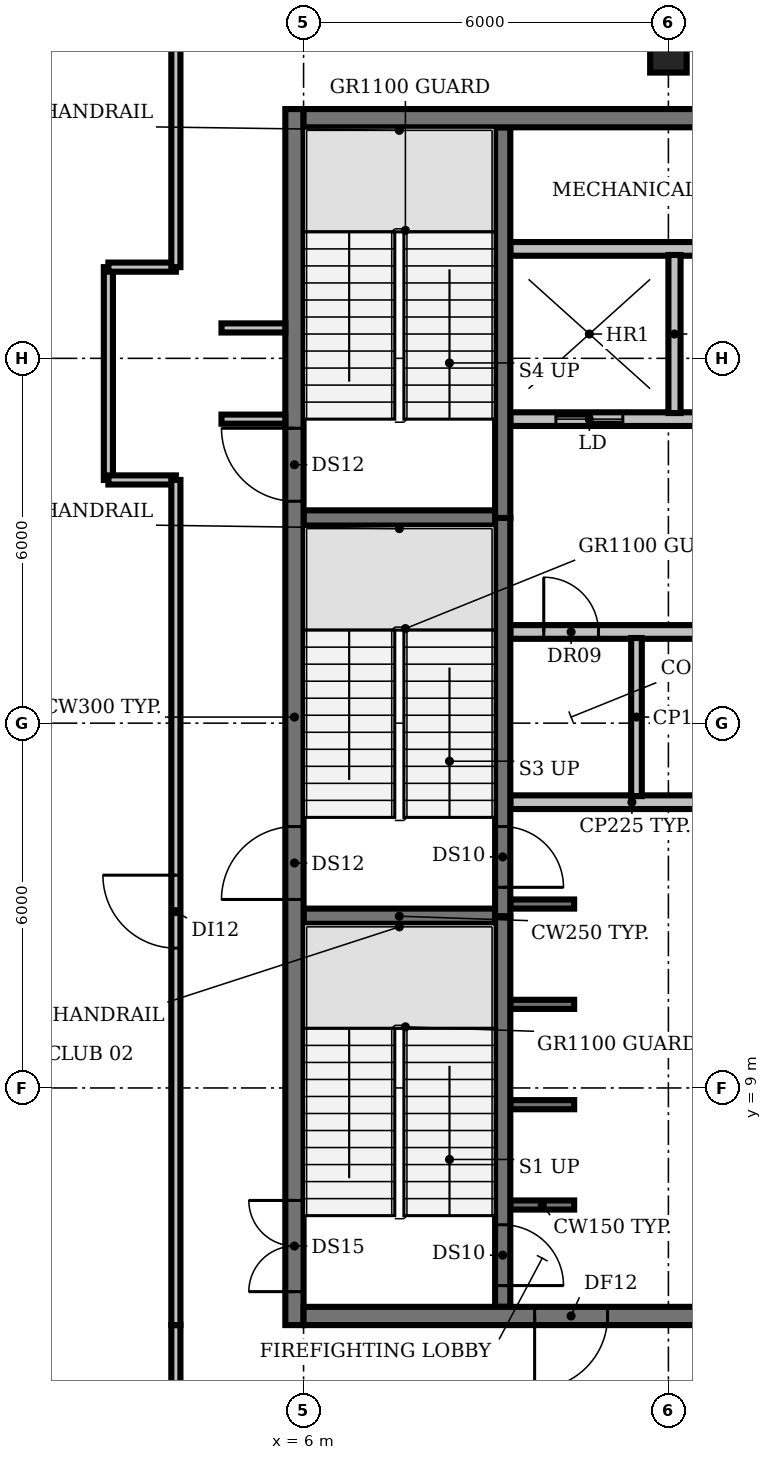
"""IFC4 building model, lengths in metres.
Left out: names, types, materials, properties, quantities, classifications, styles, units other than length and angle.
Written with IfcOpenShell. Run it as: python <this file> out.ifc"""

import sys

from ifc_helpers import new_model, si_unit, direction, frame, frame_2d, origin, origin_2d, place, context, subcontext, project, spatial, rectangle, extrude, element, fill, save


model = new_model("IFC4")
c1 = context("Model", 3, precision=1e-05, world=origin(), true_north=direction((0.0, 1.0)))
c2 = subcontext(c1, "Body", "Model", "MODEL_VIEW")
j1 = project(units=[si_unit("LENGTHUNIT", "METRE"), si_unit("PLANEANGLEUNIT", "RADIAN")], contexts=[c1])
p1 = place(None, origin())
s1 = spatial("IfcSite", under=j1, at=p1, CompositionType="ELEMENT")
p2 = place(p1, origin())
s2 = spatial("IfcBuilding", under=s1, at=p2, CompositionType="ELEMENT")
p3 = place(p2, frame((0.0, 0.0, 323.0)))
s3 = spatial("IfcBuildingStorey", under=s2, at=p3, CompositionType="ELEMENT", Elevation=323.0)
p4 = place(p3, frame((12.0, 26.0, 0.0), z_axis=(0.0, 0.0, 1.0), x_axis=(1.0, 0.0, 0.0)))
e1 = element("IfcColumn", 1, at=p4, inside=s3, PredefinedType="COLUMN", context=c2, shape_type="SweptSolid", body=[
    extrude(rectangle(XDim=0.6, YDim=0.6, at=origin_2d()), origin(), (0.0, 0.0, 1.0), 3.9),
])
for number, where, z_axis, x_axis in (
    (2, (9.4, 7.075, 0.0), (0.0, 0.0, 1.0), (1.0, 0.0, 0.0)),
    (3, (9.4, 8.725, 0.0), (0.0, 0.0, 1.0), (1.0, 0.0, 0.0)),
    (4, (9.4, 10.375, 0.0), (0.0, 0.0, 1.0), (1.0, 0.0, 0.0)),
):
    element("IfcWall", number, at=place(p3, frame(where, z_axis=z_axis, x_axis=x_axis)), inside=s3, PredefinedType="SHEAR", context=c2, shape_type="SweptSolid", body=[
        extrude(rectangle(XDim=1.05, YDim=0.15, at=frame_2d((0.525, 0.0))), origin(), (0.0, 0.0, 1.0), 3.9),
    ])
p5 = place(p3, frame((6.0, 11.825, 0.0), z_axis=(0.0, 0.0, 1.0), x_axis=(1.0, 0.0, 0.0)))
e5 = element("IfcWall", 5, at=p5, inside=s3, PredefinedType="SHEAR", context=c2, shape_type="SweptSolid", body=[
    extrude(rectangle(XDim=3.15, YDim=0.25, at=frame_2d((1.575, 0.0))), origin(), (0.0, 0.0, 1.0), 3.9),
])
p6 = place(p3, frame((9.4, 12.025, 0.0), z_axis=(0.0, 0.0, 1.0), x_axis=(1.0, 0.0, 0.0)))
e6 = element("IfcWall", 6, at=p6, inside=s3, PredefinedType="SHEAR", context=c2, shape_type="SweptSolid", body=[
    extrude(rectangle(XDim=1.05, YDim=0.15, at=frame_2d((0.525, 0.0))), origin(), (0.0, 0.0, 1.0), 3.9),
])
p7 = place(p3, frame((9.4, 13.7, 0.0), z_axis=(0.0, 0.0, 1.0), x_axis=(1.0, 0.0, 0.0)))
e7 = element("IfcWall", 7, at=p7, inside=s3, PredefinedType="PARTITIONING", context=c2, shape_type="SweptSolid", body=[
    extrude(rectangle(XDim=4.0, YDim=0.225, at=frame_2d((2.0, 0.0))), origin(), (0.0, 0.0, 1.0), 3.9),
])
p8 = place(p3, frame((9.4, 16.5, 0.0), z_axis=(0.0, 0.0, 1.0), x_axis=(1.0, 0.0, 0.0)))
e8 = element("IfcWall", 8, at=p8, inside=s3, PredefinedType="PARTITIONING", context=c2, shape_type="SweptSolid", body=[
    extrude(rectangle(XDim=14.6, YDim=0.225, at=frame_2d((7.3, 0.0))), origin(), (0.0, 0.0, 1.0), 3.9),
])
p9 = place(p8, frame((0.55, 0.0, 0.0)))
e9 = element("IfcOpeningElement", 9, at=p9, cuts=e8, PredefinedType="OPENING", context=c2, shape_type="SweptSolid", body=[
    extrude(rectangle(XDim=0.9, YDim=2.1, at=frame_2d((0.45, 1.05))), frame((0.0, 0.123, 0.0), z_axis=(0.0, -1.0, 0.0), x_axis=(1.0, 0.0, 0.0)), (0.0, 0.0, 1.0), 0.245),
])
p10 = place(p8, frame((6.075, 0.0, 0.0)))
e10 = element("IfcOpeningElement", 10, at=p10, cuts=e8, PredefinedType="OPENING", context=c2, shape_type="SweptSolid", body=[
    extrude(rectangle(XDim=1.0, YDim=2.1, at=frame_2d((0.5, 1.05))), frame((0.0, 0.123, 0.0), z_axis=(0.0, -1.0, 0.0), x_axis=(1.0, 0.0, 0.0)), (0.0, 0.0, 1.0), 0.245),
])
p11 = place(p8, frame((11.647, 0.0, 0.0)))
e11 = element("IfcOpeningElement", 11, at=p11, cuts=e8, PredefinedType="OPENING", context=c2, shape_type="SweptSolid", body=[
    extrude(rectangle(XDim=0.9, YDim=2.1, at=frame_2d((0.45, 1.05))), frame((0.0, 0.123, 0.0), z_axis=(0.0, -1.0, 0.0), x_axis=(1.0, 0.0, 0.0)), (0.0, 0.0, 1.0), 0.245),
])
p12 = place(p8, frame((13.423, 0.0, 0.0)))
e12 = element("IfcOpeningElement", 12, at=p12, cuts=e8, PredefinedType="OPENING", context=c2, shape_type="SweptSolid", body=[
    extrude(rectangle(XDim=0.9, YDim=2.1, at=frame_2d((0.45, 1.05))), frame((0.0, 0.123, 0.0), z_axis=(0.0, -1.0, 0.0), x_axis=(1.0, 0.0, 0.0)), (0.0, 0.0, 1.0), 0.245),
])
p13 = place(p3, frame((6.0, 18.375, 0.0), z_axis=(0.0, 0.0, 1.0), x_axis=(1.0, 0.0, 0.0)))
e13 = element("IfcWall", 13, at=p13, inside=s3, PredefinedType="SHEAR", context=c2, shape_type="SweptSolid", body=[
    extrude(rectangle(XDim=3.15, YDim=0.25, at=frame_2d((1.575, 0.0))), origin(), (0.0, 0.0, 1.0), 3.9),
])
p14 = place(p3, frame((24.0, 20.0, 0.0), z_axis=(0.0, 0.0, 1.0), x_axis=(-1.0, 0.0, 0.0)))
e14 = element("IfcWall", 14, at=p14, inside=s3, PredefinedType="PARTITIONING", context=c2, shape_type="SweptSolid", body=[
    extrude(rectangle(XDim=14.6, YDim=0.225, at=frame_2d((7.3, 0.0))), origin(), (0.0, 0.0, 1.0), 3.9),
])
p15 = place(p14, frame((12.75, 0.0, 0.0)))
e15 = element("IfcOpeningElement", 15, at=p15, cuts=e14, PredefinedType="OPENING", context=c2, shape_type="SweptSolid", body=[
    extrude(rectangle(XDim=1.1, YDim=2.1, at=frame_2d((0.55, 1.05))), frame((0.0, 0.123, 0.0), z_axis=(0.0, -1.0, 0.0), x_axis=(1.0, 0.0, 0.0)), (0.0, 0.0, 1.0), 0.245),
])
p16 = place(p14, frame((9.95, 0.0, 0.0)))
e16 = element("IfcOpeningElement", 16, at=p16, cuts=e14, PredefinedType="OPENING", context=c2, shape_type="SweptSolid", body=[
    extrude(rectangle(XDim=1.1, YDim=2.1, at=frame_2d((0.55, 1.05))), frame((0.0, 0.123, 0.0), z_axis=(0.0, -1.0, 0.0), x_axis=(1.0, 0.0, 0.0)), (0.0, 0.0, 1.0), 0.245),
])
p17 = place(p14, frame((7.15, 0.0, 0.0)))
e17 = element("IfcOpeningElement", 17, at=p17, cuts=e14, PredefinedType="OPENING", context=c2, shape_type="SweptSolid", body=[
    extrude(rectangle(XDim=1.1, YDim=2.1, at=frame_2d((0.55, 1.05))), frame((0.0, 0.123, 0.0), z_axis=(0.0, -1.0, 0.0), x_axis=(1.0, 0.0, 0.0)), (0.0, 0.0, 1.0), 0.245),
])
p18 = place(p14, frame((4.35, 0.0, 0.0)))
e18 = element("IfcOpeningElement", 18, at=p18, cuts=e14, PredefinedType="OPENING", context=c2, shape_type="SweptSolid", body=[
    extrude(rectangle(XDim=1.1, YDim=2.1, at=frame_2d((0.55, 1.05))), frame((0.0, 0.123, 0.0), z_axis=(0.0, -1.0, 0.0), x_axis=(1.0, 0.0, 0.0)), (0.0, 0.0, 1.0), 0.245),
])
p19 = place(p14, frame((2.137, 0.0, 0.0)))
e19 = element("IfcOpeningElement", 19, at=p19, cuts=e14, PredefinedType="OPENING", context=c2, shape_type="SweptSolid", body=[
    extrude(rectangle(XDim=0.9, YDim=2.1, at=frame_2d((0.45, 1.05))), frame((0.0, 0.123, 0.0), z_axis=(0.0, -1.0, 0.0), x_axis=(1.0, 0.0, 0.0)), (0.0, 0.0, 1.0), 0.245),
])
p20 = place(p14, frame((0.562, 0.0, 0.0)))
e20 = element("IfcOpeningElement", 20, at=p20, cuts=e14, PredefinedType="OPENING", context=c2, shape_type="SweptSolid", body=[
    extrude(rectangle(XDim=0.9, YDim=2.1, at=frame_2d((0.45, 1.05))), frame((0.0, 0.123, 0.0), z_axis=(0.0, -1.0, 0.0), x_axis=(1.0, 0.0, 0.0)), (0.0, 0.0, 1.0), 0.245),
])
p21 = place(p3, frame((9.4, 22.8, 0.0), z_axis=(0.0, 0.0, 1.0), x_axis=(1.0, 0.0, 0.0)))
e21 = element("IfcWall", 21, at=p21, inside=s3, PredefinedType="PARTITIONING", context=c2, shape_type="SweptSolid", body=[
    extrude(rectangle(XDim=14.6, YDim=0.225, at=frame_2d((7.3, 0.0))), origin(), (0.0, 0.0, 1.0), 3.9),
])
p22 = place(p3, frame((9.275, 11.825, 0.0), z_axis=(0.0, 0.0, 1.0), x_axis=(0.0, -1.0, 0.0)))
e22 = element("IfcWall", 22, at=p22, inside=s3, PredefinedType="SHEAR", context=c2, shape_type="SweptSolid", body=[
    extrude(rectangle(XDim=6.425, YDim=0.25, at=frame_2d((3.212, 0.0))), origin(), (0.0, 0.0, 1.0), 3.9),
])
p23 = place(p22, frame((5.075, 0.0, 0.0)))
e23 = element("IfcOpeningElement", 23, at=p23, cuts=e22, PredefinedType="OPENING", context=c2, shape_type="SweptSolid", body=[
    extrude(rectangle(XDim=1.0, YDim=2.1, at=frame_2d((0.5, 1.05))), frame((0.0, 0.135, 0.0), z_axis=(0.0, -1.0, 0.0), x_axis=(1.0, 0.0, 0.0)), (0.0, 0.0, 1.0), 0.27),
])
p24 = place(p3, frame((9.275, 18.375, 0.0), z_axis=(0.0, 0.0, 1.0), x_axis=(0.0, -1.0, 0.0)))
e24 = element("IfcWall", 24, at=p24, inside=s3, PredefinedType="SHEAR", context=c2, shape_type="SweptSolid", body=[
    extrude(rectangle(XDim=6.55, YDim=0.25, at=frame_2d((3.275, 0.0))), origin(), (0.0, 0.0, 1.0), 3.9),
])
p25 = place(p24, frame((5.075, 0.0, 0.0)))
e25 = element("IfcOpeningElement", 25, at=p25, cuts=e24, PredefinedType="OPENING", context=c2, shape_type="SweptSolid", body=[
    extrude(rectangle(XDim=1.0, YDim=2.1, at=frame_2d((0.5, 1.05))), frame((0.0, 0.135, 0.0), z_axis=(0.0, -1.0, 0.0), x_axis=(1.0, 0.0, 0.0)), (0.0, 0.0, 1.0), 0.27),
])
p26 = place(p3, frame((9.275, 18.375, 0.0), z_axis=(0.0, 0.0, 1.0), x_axis=(0.0, 1.0, 0.0)))
e26 = element("IfcWall", 26, at=p26, inside=s3, PredefinedType="SHEAR", context=c2, shape_type="SweptSolid", body=[
    extrude(rectangle(XDim=6.425, YDim=0.25, at=frame_2d((3.212, 0.0))), origin(), (0.0, 0.0, 1.0), 3.9),
])
p27 = place(p3, frame((11.475, 13.8, 0.0), z_axis=(0.0, 0.0, 1.0), x_axis=(0.0, 1.0, 0.0)))
e27 = element("IfcWall", 27, at=p27, inside=s3, PredefinedType="PARTITIONING", context=c2, shape_type="SweptSolid", body=[
    extrude(rectangle(XDim=2.6, YDim=0.175, at=frame_2d((1.3, 0.0))), origin(), (0.0, 0.0, 1.0), 3.9),
])
p28 = place(p3, frame((12.1, 20.1, 0.0), z_axis=(0.0, 0.0, 1.0), x_axis=(0.0, 1.0, 0.0)))
e28 = element("IfcWall", 28, at=p28, inside=s3, PredefinedType="SOLIDWALL", context=c2, shape_type="SweptSolid", body=[
    extrude(rectangle(XDim=2.6, YDim=0.2, at=frame_2d((1.3, 0.0))), origin(), (0.0, 0.0, 1.0), 3.9),
])
p29 = place(p3, frame((5.85, 5.1, 0.0), z_axis=(0.0, 0.0, 1.0), x_axis=(0.0, 1.0, 0.0)))
e29 = element("IfcWall", 29, at=p29, inside=s3, PredefinedType="SHEAR", context=c2, shape_type="SweptSolid", body=[
    extrude(rectangle(XDim=20.0, YDim=0.3, at=frame_2d((10.0, 0.0))), origin(), (0.0, 0.0, 1.0), 3.9),
])
p30 = place(p29, frame((0.55, 0.0, 0.0)))
e30 = element("IfcOpeningElement", 30, at=p30, cuts=e29, PredefinedType="OPENING", context=c2, shape_type="SweptSolid", body=[
    extrude(rectangle(XDim=1.5, YDim=2.1, at=frame_2d((0.75, 1.05))), frame((0.0, 0.16, 0.0), z_axis=(0.0, -1.0, 0.0), x_axis=(1.0, 0.0, 0.0)), (0.0, 0.0, 1.0), 0.32),
])
p31 = place(p29, frame((7.0, 0.0, 0.0)))
e31 = element("IfcOpeningElement", 31, at=p31, cuts=e29, PredefinedType="OPENING", context=c2, shape_type="SweptSolid", body=[
    extrude(rectangle(XDim=1.2, YDim=2.1, at=frame_2d((0.6, 1.05))), frame((0.0, 0.16, 0.0), z_axis=(0.0, -1.0, 0.0), x_axis=(1.0, 0.0, 0.0)), (0.0, 0.0, 1.0), 0.32),
])
p32 = place(p29, frame((13.55, 0.0, 0.0)))
e32 = element("IfcOpeningElement", 32, at=p32, cuts=e29, PredefinedType="OPENING", context=c2, shape_type="SweptSolid", body=[
    extrude(rectangle(XDim=1.2, YDim=2.1, at=frame_2d((0.6, 1.05))), frame((0.0, 0.16, 0.0), z_axis=(0.0, -1.0, 0.0), x_axis=(1.0, 0.0, 0.0)), (0.0, 0.0, 1.0), 0.32),
])
p33 = place(p3, frame((24.0, 5.25, 0.0), z_axis=(0.0, 0.0, 1.0), x_axis=(-1.0, 0.0, 0.0)))
e33 = element("IfcWall", 33, at=p33, inside=s3, PredefinedType="SHEAR", context=c2, shape_type="SweptSolid", body=[
    extrude(rectangle(XDim=18.0, YDim=0.3, at=frame_2d((9.0, 0.0))), origin(), (0.0, 0.0, 1.0), 3.9),
])
p34 = place(p33, frame((13.0, 0.0, 0.0)))
e34 = element("IfcOpeningElement", 34, at=p34, cuts=e33, PredefinedType="OPENING", context=c2, shape_type="SweptSolid", body=[
    extrude(rectangle(XDim=1.2, YDim=2.1, at=frame_2d((0.6, 1.05))), frame((0.0, 0.16, 0.0), z_axis=(0.0, -1.0, 0.0), x_axis=(1.0, 0.0, 0.0)), (0.0, 0.0, 1.0), 0.32),
])
p35 = place(p33, frame((4.9, 0.0, 0.0)))
e35 = element("IfcOpeningElement", 35, at=p35, cuts=e33, PredefinedType="OPENING", context=c2, shape_type="SweptSolid", body=[
    extrude(rectangle(XDim=1.0, YDim=2.1, at=frame_2d((0.5, 1.05))), frame((0.0, 0.16, 0.0), z_axis=(0.0, -1.0, 0.0), x_axis=(1.0, 0.0, 0.0)), (0.0, 0.0, 1.0), 0.32),
])
p36 = place(p3, frame((6.0, 24.95, 0.0), z_axis=(0.0, 0.0, 1.0), x_axis=(1.0, 0.0, 0.0)))
e36 = element("IfcWall", 36, at=p36, inside=s3, PredefinedType="SHEAR", context=c2, shape_type="SweptSolid", body=[
    extrude(rectangle(XDim=18.0, YDim=0.3, at=frame_2d((9.0, 0.0))), origin(), (0.0, 0.0, 1.0), 3.9),
])
p37 = place(p3, frame((2.79, 19.0, 0.0), z_axis=(0.0, 0.0, 1.0), x_axis=(0.0, 1.0, 0.0)))
e37 = element("IfcWall", 37, at=p37, inside=s3, PredefinedType="PARTITIONING", context=c2, shape_type="SweptSolid", body=[
    extrude(rectangle(XDim=3.5, YDim=0.15, at=frame_2d((1.75, 0.0))), origin(), (0.0, 0.0, 1.0), 2.48),
])
for number, where, z_axis, x_axis in (
    (38, (2.79, 19.0, 0.0), (0.0, 0.0, 1.0), (1.0, 0.0, 0.0)),
    (39, (2.79, 22.5, 0.0), (0.0, 0.0, 1.0), (1.0, 0.0, 0.0)),
):
    element("IfcWall", number, at=place(p3, frame(where, z_axis=z_axis, x_axis=x_axis)), inside=s3, PredefinedType="PARTITIONING", context=c2, shape_type="SweptSolid", body=[
        extrude(rectangle(XDim=1.11, YDim=0.15, at=frame_2d((0.555, 0.0))), origin(), (0.0, 0.0, 1.0), 2.48),
    ])
p38 = place(p3, frame((3.9, 2.1, 0.0), z_axis=(0.0, 0.0, 1.0), x_axis=(0.0, 1.0, 0.0)))
e40 = element("IfcWall", 40, at=p38, inside=s3, PredefinedType="PARTITIONING", context=c2, shape_type="SweptSolid", body=[
    extrude(rectangle(XDim=3.0, YDim=0.15, at=frame_2d((1.5, 0.0))), origin(), (0.0, 0.0, 1.0), 2.48),
])
p39 = place(p3, frame((3.9, 5.1, 0.0), z_axis=(0.0, 0.0, 1.0), x_axis=(0.0, 1.0, 0.0)))
e41 = element("IfcWall", 41, at=p39, inside=s3, PredefinedType="PARTITIONING", context=c2, shape_type="SweptSolid", body=[
    extrude(rectangle(XDim=13.9, YDim=0.15, at=frame_2d((6.95, 0.0))), origin(), (0.0, 0.0, 1.0), 2.48),
])
p40 = place(p39, frame((6.2, 0.0, 0.0)))
e42 = element("IfcOpeningElement", 42, at=p40, cuts=e41, PredefinedType="OPENING", context=c2, shape_type="SweptSolid", body=[
    extrude(rectangle(XDim=1.2, YDim=2.1, at=frame_2d((0.6, 1.05))), frame((0.0, 0.085, 0.0), z_axis=(0.0, -1.0, 0.0), x_axis=(1.0, 0.0, 0.0)), (0.0, 0.0, 1.0), 0.17),
])
p41 = place(p3, frame((3.9, 22.5, 0.0), z_axis=(0.0, 0.0, 1.0), x_axis=(0.0, 1.0, 0.0)))
e43 = element("IfcWall", 43, at=p41, inside=s3, PredefinedType="PARTITIONING", context=c2, shape_type="SweptSolid", body=[
    extrude(rectangle(XDim=5.6, YDim=0.15, at=frame_2d((2.8, 0.0))), origin(), (0.0, 0.0, 1.0), 2.48),
])
for number, where, z_axis, x_axis in (
    (44, (4.65, 20.0, 0.0), (0.0, 0.0, 1.0), (1.0, 0.0, 0.0)),
    (45, (4.65, 21.5, 0.0), (0.0, 0.0, 1.0), (1.0, 0.0, 0.0)),
):
    element("IfcWall", number, at=place(p3, frame(where, z_axis=z_axis, x_axis=x_axis)), inside=s3, PredefinedType="PARTITIONING", context=c2, shape_type="SweptSolid", body=[
        extrude(rectangle(XDim=1.05, YDim=0.15, at=frame_2d((0.525, 0.0))), origin(), (0.0, 0.0, 1.0), 2.48),
    ])
p42 = place(p9, origin())
e46 = element("IfcDoor", 46, at=p42, inside=s3, OperationType="SINGLE_SWING_LEFT", PredefinedType="DOOR", context=c2, shape_type="SweptSolid", body=[
    extrude(rectangle(XDim=0.9, YDim=2.1, at=frame_2d((0.45, 1.05))), frame((0.0, 0.025, 0.0), z_axis=(0.0, -1.0, 0.0), x_axis=(1.0, 0.0, 0.0)), (0.0, 0.0, 1.0), 0.05),
])
fill(e9, e46)
p43 = place(p15, origin())
e47 = element("IfcDoor", 47, at=p43, inside=s3, OperationType="DOUBLE_DOOR_SLIDING", PredefinedType="DOOR", context=c2, shape_type="SweptSolid", body=[
    extrude(rectangle(XDim=1.1, YDim=2.1, at=frame_2d((0.55, 1.05))), frame((0.0, 0.025, 0.0), z_axis=(0.0, -1.0, 0.0), x_axis=(1.0, 0.0, 0.0)), (0.0, 0.0, 1.0), 0.05),
])
fill(e15, e47)
p44 = place(p23, origin())
e48 = element("IfcDoor", 48, at=p44, inside=s3, OperationType="SINGLE_SWING_RIGHT", PredefinedType="DOOR", context=c2, shape_type="SweptSolid", body=[
    extrude(rectangle(XDim=1.0, YDim=2.1, at=frame_2d((0.5, 1.05))), frame((0.0, 0.025, 0.0), z_axis=(0.0, -1.0, 0.0), x_axis=(1.0, 0.0, 0.0)), (0.0, 0.0, 1.0), 0.05),
])
fill(e23, e48)
p45 = place(p25, origin())
e49 = element("IfcDoor", 49, at=p45, inside=s3, OperationType="SINGLE_SWING_RIGHT", PredefinedType="DOOR", context=c2, shape_type="SweptSolid", body=[
    extrude(rectangle(XDim=1.0, YDim=2.1, at=frame_2d((0.5, 1.05))), frame((0.0, 0.025, 0.0), z_axis=(0.0, -1.0, 0.0), x_axis=(1.0, 0.0, 0.0)), (0.0, 0.0, 1.0), 0.05),
])
fill(e25, e49)
p46 = place(p30, origin())
e50 = element("IfcDoor", 50, at=p46, inside=s3, OperationType="DOUBLE_DOOR_SINGLE_SWING", PredefinedType="DOOR", context=c2, shape_type="SweptSolid", body=[
    extrude(rectangle(XDim=1.5, YDim=2.1, at=frame_2d((0.75, 1.05))), frame((0.0, 0.025, 0.0), z_axis=(0.0, -1.0, 0.0), x_axis=(1.0, 0.0, 0.0)), (0.0, 0.0, 1.0), 0.05),
])
fill(e30, e50)
p47 = place(p31, origin())
e51 = element("IfcDoor", 51, at=p47, inside=s3, OperationType="SINGLE_SWING_LEFT", PredefinedType="DOOR", context=c2, shape_type="SweptSolid", body=[
    extrude(rectangle(XDim=1.2, YDim=2.1, at=frame_2d((0.6, 1.05))), frame((0.0, 0.025, 0.0), z_axis=(0.0, -1.0, 0.0), x_axis=(1.0, 0.0, 0.0)), (0.0, 0.0, 1.0), 0.05),
])
fill(e31, e51)
p48 = place(p32, origin())
e52 = element("IfcDoor", 52, at=p48, inside=s3, OperationType="SINGLE_SWING_RIGHT", PredefinedType="DOOR", context=c2, shape_type="SweptSolid", body=[
    extrude(rectangle(XDim=1.2, YDim=2.1, at=frame_2d((0.6, 1.05))), frame((0.0, 0.025, 0.0), z_axis=(0.0, -1.0, 0.0), x_axis=(1.0, 0.0, 0.0)), (0.0, 0.0, 1.0), 0.05),
])
fill(e32, e52)
p49 = place(p34, origin())
e53 = element("IfcDoor", 53, at=p49, inside=s3, OperationType="SINGLE_SWING_RIGHT", PredefinedType="DOOR", context=c2, shape_type="SweptSolid", body=[
    extrude(rectangle(XDim=1.2, YDim=2.1, at=frame_2d((0.6, 1.05))), frame((0.0, 0.025, 0.0), z_axis=(0.0, -1.0, 0.0), x_axis=(1.0, 0.0, 0.0)), (0.0, 0.0, 1.0), 0.05),
])
fill(e34, e53)
p50 = place(p40, origin())
e54 = element("IfcDoor", 54, at=p50, inside=s3, OperationType="SINGLE_SWING_RIGHT", PredefinedType="DOOR", context=c2, shape_type="SweptSolid", body=[
    extrude(rectangle(XDim=1.2, YDim=2.1, at=frame_2d((0.6, 1.05))), frame((0.0, 0.025, 0.0), z_axis=(0.0, -1.0, 0.0), x_axis=(1.0, 0.0, 0.0)), (0.0, 0.0, 1.0), 0.05),
])
fill(e42, e54)
save(model, sys.argv[1])
